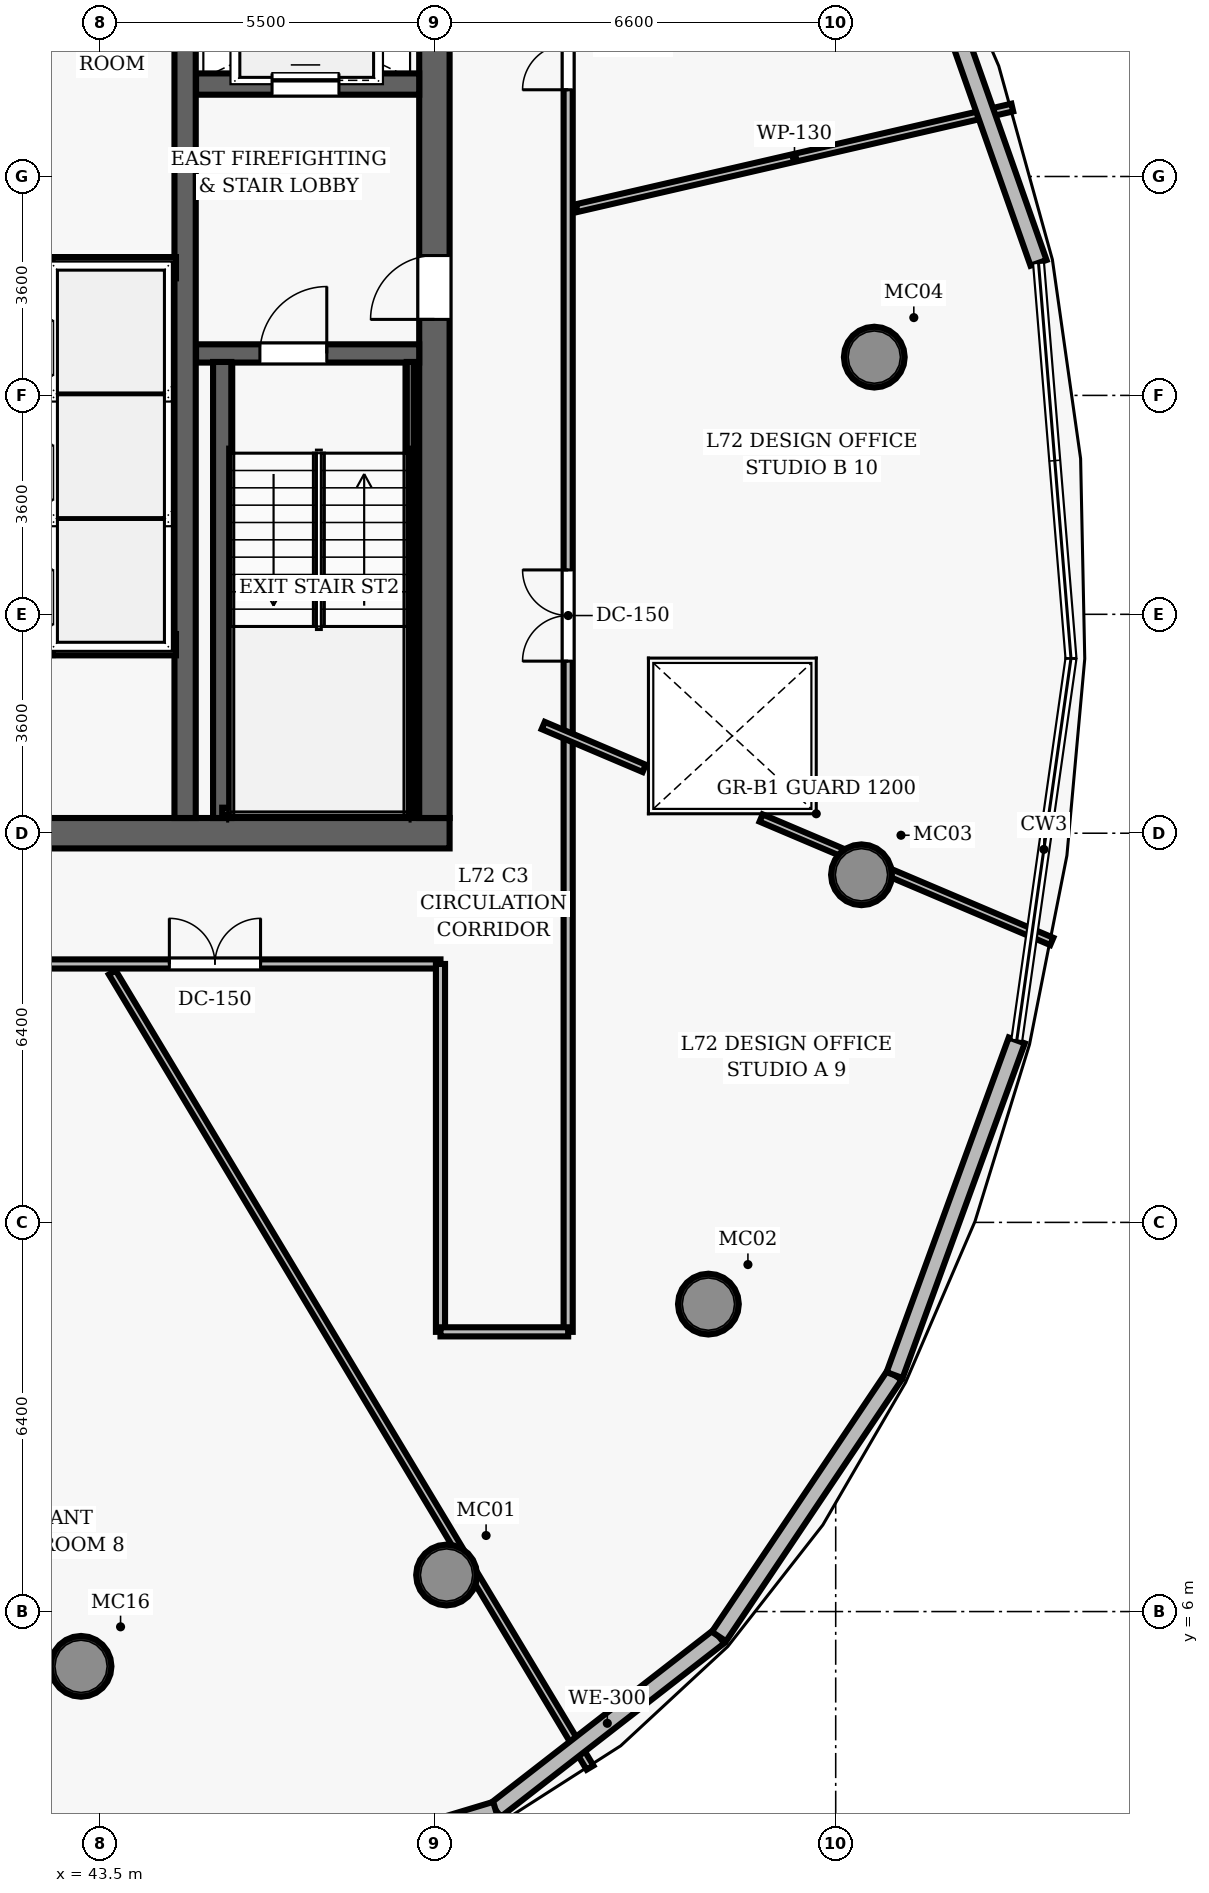
"""IFC4 building model, lengths in metres.
Left out: names, types, materials, properties, quantities, classifications, styles, units other than length and angle.
Written with IfcOpenShell. Run it as: python <this file> out.ifc"""

import sys

from ifc_helpers import new_model, si_unit, direction, frame, frame_2d, origin, origin_2d, place, context, subcontext, project, spatial, rectangle, hollow_circle, extrude, element, fill, save


model = new_model("IFC4")
c1 = context("Model", 3, precision=1e-05, world=origin(), true_north=direction((0.0, 1.0)))
c2 = subcontext(c1, "Body", "Model", "MODEL_VIEW")
j1 = project(units=[si_unit("LENGTHUNIT", "METRE"), si_unit("PLANEANGLEUNIT", "RADIAN")], contexts=[c1])
p1 = place(None, origin())
s1 = spatial("IfcSite", under=j1, at=p1, CompositionType="ELEMENT")
p2 = place(p1, origin())
s2 = spatial("IfcBuilding", under=s1, at=p2, CompositionType="ELEMENT")
p3 = place(p2, frame((0.0, 0.0, 284.4)))
s3 = spatial("IfcBuildingStorey", under=s2, at=p3, CompositionType="ELEMENT", Elevation=284.4)
p4 = place(p3, frame((26.75, 18.8, 0.0), z_axis=(0.0, 0.0, 1.0), x_axis=(1.0, 0.0, 0.0)))
e1 = element("IfcWall", 1, at=p4, inside=s3, PredefinedType="SHEAR", context=c2, shape_type="SweptSolid", body=[
    extrude(rectangle(XDim=22.5, YDim=0.5, at=frame_2d((11.25, 0.0))), origin(), (0.0, 0.0, 1.0), 3.85),
])
p5 = place(p4, frame((14.47, 0.0, 0.0)))
e2 = element("IfcOpeningElement", 2, at=p5, cuts=e1, PredefinedType="OPENING", context=c2, shape_type="SweptSolid", body=[
    extrude(rectangle(XDim=1.05, YDim=2.15, at=frame_2d((0.525, 1.075))), frame((0.0, 0.26, 0.0), z_axis=(0.0, -1.0, 0.0), x_axis=(1.0, 0.0, 0.0)), (0.0, 0.0, 1.0), 0.52),
])
p6 = place(p3, frame((49.0, 19.05, 0.0), z_axis=(0.0, 0.0, 1.0), x_axis=(0.0, 1.0, 0.0)))
e3 = element("IfcWall", 3, at=p6, inside=s3, PredefinedType="SHEAR", context=c2, shape_type="SweptSolid", body=[
    extrude(rectangle(XDim=13.9, YDim=0.5, at=frame_2d((6.95, 0.0))), origin(), (0.0, 0.0, 1.0), 3.85),
])
p7 = place(p6, frame((8.2, 0.0, 0.0)))
e4 = element("IfcOpeningElement", 4, at=p7, cuts=e3, PredefinedType="OPENING", context=c2, shape_type="SweptSolid", body=[
    extrude(rectangle(XDim=1.05, YDim=2.15, at=frame_2d((0.525, 1.075))), frame((0.0, 0.26, 0.0), z_axis=(0.0, -1.0, 0.0), x_axis=(1.0, 0.0, 0.0)), (0.0, 0.0, 1.0), 0.52),
])
p8 = place(p3, frame((44.9, 19.05, 0.0), z_axis=(0.0, 0.0, 1.0), x_axis=(0.0, 1.0, 0.0)))
e5 = element("IfcWall", 5, at=p8, inside=s3, PredefinedType="SHEAR", context=c2, shape_type="SweptSolid", body=[
    extrude(rectangle(XDim=13.9, YDim=0.35, at=frame_2d((6.95, 0.0))), origin(), (0.0, 0.0, 1.0), 3.85),
])
for number, where, z_axis, x_axis in (
    (6, (49.2, 6.601, 0.0), (0.0, 0.0, 1.0), (1.0, 0.0, 0.0)),
    (7, (53.506, 11.056, 0.0), (0.0, 0.0, 1.0), (1.0, 0.0, 0.0)),
    (8, (56.024, 18.116, 0.0), (0.0, 0.0, 1.0), (1.0, 0.0, 0.0)),
    (9, (56.235, 26.629, 0.0), (0.0, 0.0, 1.0), (1.0, 0.0, 0.0)),
    (10, (43.188, 5.099, 0.0), (0.0, 0.0, 1.0), (1.0, 0.0, 0.0)),
):
    element("IfcColumn", number, at=place(p3, frame(where, z_axis=z_axis, x_axis=x_axis)), inside=s3, PredefinedType="COLUMN", context=c2, shape_type="SweptSolid", body=[
        extrude(hollow_circle(Radius=0.5, WallThickness=0.045, at=origin_2d()), origin(), (0.0, 0.0, 1.0), 3.85),
    ])
p9 = place(p3, frame((45.08, 26.69, 0.0), z_axis=(0.0, 0.0, 1.0), x_axis=(1.0, 0.0, 0.0)))
e11 = element("IfcWall", 11, at=p9, inside=s3, PredefinedType="SHEAR", context=c2, shape_type="SweptSolid", body=[
    extrude(rectangle(XDim=3.67, YDim=0.3, at=frame_2d((1.835, 0.0))), origin(), (0.0, 0.0, 1.0), 3.85),
])
p10 = place(p9, frame((1.05, 0.0, 0.0)))
e12 = element("IfcOpeningElement", 12, at=p10, cuts=e11, PredefinedType="OPENING", context=c2, shape_type="SweptSolid", body=[
    extrude(rectangle(XDim=1.1, YDim=2.15, at=frame_2d((0.55, 1.075))), frame((0.0, 0.16, 0.0), z_axis=(0.0, -1.0, 0.0), x_axis=(1.0, 0.0, 0.0)), (0.0, 0.0, 1.0), 0.32),
])
p11 = place(p3, frame((45.51, 19.05, 0.0), z_axis=(0.0, 0.0, 1.0), x_axis=(0.0, 1.0, 0.0)))
e13 = element("IfcWall", 13, at=p11, inside=s3, PredefinedType="SHEAR", context=c2, shape_type="SweptSolid", body=[
    extrude(rectangle(XDim=7.5, YDim=0.3, at=frame_2d((3.75, 0.0))), origin(), (0.0, 0.0, 1.0), 3.85),
])
p12 = place(p3, frame((48.605, 19.1, 0.0), z_axis=(0.0, 0.0, 1.0), x_axis=(0.0, 1.0, 0.0)))
e14 = element("IfcWall", 14, at=p12, inside=s3, PredefinedType="SHEAR", context=c2, shape_type="SweptSolid", body=[
    extrude(rectangle(XDim=7.45, YDim=0.12, at=frame_2d((3.725, 0.0))), origin(), (0.0, 0.0, 1.0), 3.85),
])
p13 = place(p3, frame((45.51, 19.16, 0.0), z_axis=(0.0, 0.0, 1.0), x_axis=(1.0, 0.0, 0.0)))
e15 = element("IfcWall", 15, at=p13, inside=s3, PredefinedType="SHEAR", context=c2, shape_type="SweptSolid", body=[
    extrude(rectangle(XDim=3.095, YDim=0.12, at=frame_2d((1.547, 0.0))), origin(), (0.0, 0.0, 1.0), 3.85),
])
p14 = place(p3, frame((45.08, 31.12, 0.0), z_axis=(0.0, 0.0, 1.0), x_axis=(1.0, 0.0, 0.0)))
e16 = element("IfcWall", 16, at=p14, inside=s3, PredefinedType="SHEAR", context=c2, shape_type="SweptSolid", body=[
    extrude(rectangle(XDim=3.67, YDim=0.35, at=frame_2d((1.835, 0.0))), origin(), (0.0, 0.0, 1.0), 3.04),
])
p15 = place(p14, frame((1.25, 0.0, 0.0)))
e17 = element("IfcOpeningElement", 17, at=p15, cuts=e16, PredefinedType="OPENING", context=c2, shape_type="SweptSolid", body=[
    extrude(rectangle(XDim=1.1, YDim=2.15, at=frame_2d((0.55, 1.075))), frame((0.0, 0.185, 0.0), z_axis=(0.0, -1.0, 0.0), x_axis=(1.0, 0.0, 0.0)), (0.0, 0.0, 1.0), 0.37),
])
p16 = place(p3, frame((42.55, 21.73, 0.0), z_axis=(0.0, 0.0, 1.0), x_axis=(0.0, 1.0, 0.0)))
e18 = element("IfcWall", 18, at=p16, inside=s3, PredefinedType="SHEAR", context=c2, shape_type="SweptSolid", body=[
    extrude(rectangle(XDim=6.54, YDim=0.35, at=frame_2d((3.27, 0.0))), origin(), (0.0, 0.0, 1.0), 3.04),
])
p17 = place(p16, frame((0.5, 0.0, 0.0)))
e19 = element("IfcOpeningElement", 19, at=p17, cuts=e18, PredefinedType="OPENING", context=c2, shape_type="SweptSolid", body=[
    extrude(rectangle(XDim=0.9, YDim=2.15, at=frame_2d((0.45, 1.075))), frame((0.0, 0.185, 0.0), z_axis=(0.0, -1.0, 0.0), x_axis=(1.0, 0.0, 0.0)), (0.0, 0.0, 1.0), 0.37),
])
p18 = place(p16, frame((2.55, 0.0, 0.0)))
e20 = element("IfcOpeningElement", 20, at=p18, cuts=e18, PredefinedType="OPENING", context=c2, shape_type="SweptSolid", body=[
    extrude(rectangle(XDim=0.9, YDim=2.15, at=frame_2d((0.45, 1.075))), frame((0.0, 0.185, 0.0), z_axis=(0.0, -1.0, 0.0), x_axis=(1.0, 0.0, 0.0)), (0.0, 0.0, 1.0), 0.37),
])
p19 = place(p16, frame((4.6, 0.0, 0.0)))
e21 = element("IfcOpeningElement", 21, at=p19, cuts=e18, PredefinedType="OPENING", context=c2, shape_type="SweptSolid", body=[
    extrude(rectangle(XDim=0.9, YDim=2.15, at=frame_2d((0.45, 1.075))), frame((0.0, 0.185, 0.0), z_axis=(0.0, -1.0, 0.0), x_axis=(1.0, 0.0, 0.0)), (0.0, 0.0, 1.0), 0.37),
])
for number, where, z_axis, x_axis in (
    (22, (42.72, 21.9, 0.0), (0.0, 0.0, 1.0), (1.0, 0.0, 0.0)),
    (23, (42.72, 28.1, 0.0), (0.0, 0.0, 1.0), (1.0, 0.0, 0.0)),
):
    element("IfcWall", number, at=place(p3, frame(where, z_axis=z_axis, x_axis=x_axis)), inside=s3, PredefinedType="SHEAR", context=c2, shape_type="SweptSolid", body=[
        extrude(rectangle(XDim=2.03, YDim=0.35, at=frame_2d((1.015, 0.0))), origin(), (0.0, 0.0, 1.0), 3.04),
    ])
p20 = place(p3, frame((26.9, 16.65, 0.0), z_axis=(0.0, 0.0, 1.0), x_axis=(1.0, 0.0, 0.0)))
e24 = element("IfcWall", 24, at=p20, inside=s3, PredefinedType="PARTITIONING", context=c2, shape_type="SweptSolid", body=[
    extrude(rectangle(XDim=22.2, YDim=0.15, at=frame_2d((11.1, 0.0))), origin(), (0.0, 0.0, 1.0), 3.04),
])
p21 = place(p20, frame((7.813, 0.0, 0.0)))
e25 = element("IfcOpeningElement", 25, at=p21, cuts=e24, PredefinedType="OPENING", context=c2, shape_type="SweptSolid", body=[
    extrude(rectangle(XDim=1.5, YDim=2.2, at=frame_2d((0.75, 1.1))), frame((0.0, 0.085, 0.0), z_axis=(0.0, -1.0, 0.0), x_axis=(1.0, 0.0, 0.0)), (0.0, 0.0, 1.0), 0.17),
])
p22 = place(p20, frame((14.125, 0.0, 0.0)))
e26 = element("IfcOpeningElement", 26, at=p22, cuts=e24, PredefinedType="OPENING", context=c2, shape_type="SweptSolid", body=[
    extrude(rectangle(XDim=0.95, YDim=2.15, at=frame_2d((0.475, 1.075))), frame((0.0, 0.085, 0.0), z_axis=(0.0, -1.0, 0.0), x_axis=(1.0, 0.0, 0.0)), (0.0, 0.0, 1.0), 0.17),
])
p23 = place(p20, frame((17.741, 0.0, 0.0)))
e27 = element("IfcOpeningElement", 27, at=p23, cuts=e24, PredefinedType="OPENING", context=c2, shape_type="SweptSolid", body=[
    extrude(rectangle(XDim=1.5, YDim=2.2, at=frame_2d((0.75, 1.1))), frame((0.0, 0.085, 0.0), z_axis=(0.0, -1.0, 0.0), x_axis=(1.0, 0.0, 0.0)), (0.0, 0.0, 1.0), 0.17),
])
p24 = place(p3, frame((51.2, 10.6, 0.0), z_axis=(0.0, 0.0, 1.0), x_axis=(0.0, 1.0, 0.0)))
e28 = element("IfcWall", 28, at=p24, inside=s3, PredefinedType="PARTITIONING", context=c2, shape_type="SweptSolid", body=[
    extrude(rectangle(XDim=30.168, YDim=0.15, at=frame_2d((15.084, 0.0))), origin(), (0.0, 0.0, 1.0), 3.04),
])
p25 = place(p24, frame((20.426, 0.0, 0.0)))
e29 = element("IfcOpeningElement", 29, at=p25, cuts=e28, PredefinedType="OPENING", context=c2, shape_type="SweptSolid", body=[
    extrude(rectangle(XDim=1.5, YDim=2.2, at=frame_2d((0.75, 1.1))), frame((0.0, 0.085, 0.0), z_axis=(0.0, -1.0, 0.0), x_axis=(1.0, 0.0, 0.0)), (0.0, 0.0, 1.0), 0.17),
])
p26 = place(p24, frame((11.03, 0.0, 0.0)))
e30 = element("IfcOpeningElement", 30, at=p26, cuts=e28, PredefinedType="OPENING", context=c2, shape_type="SweptSolid", body=[
    extrude(rectangle(XDim=1.5, YDim=2.2, at=frame_2d((0.75, 1.1))), frame((0.0, 0.085, 0.0), z_axis=(0.0, -1.0, 0.0), x_axis=(1.0, 0.0, 0.0)), (0.0, 0.0, 1.0), 0.17),
])
p27 = place(p3, frame((49.1, 10.6, 0.0), z_axis=(0.0, 0.0, 1.0), x_axis=(0.0, 1.0, 0.0)))
e31 = element("IfcWall", 31, at=p27, inside=s3, PredefinedType="PARTITIONING", context=c2, shape_type="SweptSolid", body=[
    extrude(rectangle(XDim=6.05, YDim=0.15, at=frame_2d((3.025, 0.0))), origin(), (0.0, 0.0, 1.0), 3.04),
])
p28 = place(p3, frame((49.1, 10.6, 0.0), z_axis=(0.0, 0.0, 1.0), x_axis=(1.0, 0.0, 0.0)))
e32 = element("IfcWall", 32, at=p28, inside=s3, PredefinedType="PARTITIONING", context=c2, shape_type="SweptSolid", body=[
    extrude(rectangle(XDim=2.1, YDim=0.15, at=frame_2d((1.05, 0.0))), origin(), (0.0, 0.0, 1.0), 3.04),
])
p29 = place(p3, frame((51.34, 29.08, 0.0), z_axis=(0.0, 0.0, 1.0), x_axis=(0.974374403815, 0.224932259114, 0.0)))
e33 = element("IfcWall", 33, at=p29, inside=s3, PredefinedType="PARTITIONING", context=c2, shape_type="SweptSolid", body=[
    extrude(rectangle(XDim=7.353, YDim=0.13, at=frame_2d((3.676, 0.0))), origin(), (0.0, 0.0, 1.0), 3.04),
])
p30 = place(p3, frame((43.702, 16.51, 0.0), z_axis=(0.0, 0.0, 1.0), x_axis=(0.515029895514, -0.857172215326, 0.0)))
e34 = element("IfcWall", 34, at=p30, inside=s3, PredefinedType="PARTITIONING", context=c2, shape_type="SweptSolid", body=[
    extrude(rectangle(XDim=15.255, YDim=0.13, at=frame_2d((7.628, 0.0))), origin(), (0.0, 0.0, 1.0), 3.04),
])
p31 = place(p3, frame((50.79, 20.571, 0.0), z_axis=(0.0, 0.0, 1.0), x_axis=(0.920456362026, -0.390845347429, 0.0)))
e35 = element("IfcWall", 35, at=p31, inside=s3, PredefinedType="PARTITIONING", context=c2, shape_type="SweptSolid", body=[
    extrude(rectangle(XDim=1.803, YDim=0.13, at=frame_2d((0.902, 0.0))), origin(), (0.0, 0.0, 1.0), 3.04),
])
p32 = place(p3, frame((54.373, 19.05, 0.0), z_axis=(0.0, 0.0, 1.0), x_axis=(0.920491611713, -0.390762322603, 0.0)))
e36 = element("IfcWall", 36, at=p32, inside=s3, PredefinedType="PARTITIONING", context=c2, shape_type="SweptSolid", body=[
    extrude(rectangle(XDim=5.193, YDim=0.13, at=frame_2d((2.597, 0.0))), origin(), (0.0, 0.0, 1.0), 3.04),
])
p33 = place(p3, frame((53.68, 5.589, 0.0), z_axis=(0.0, 0.0, 1.0), x_axis=(-0.789685647457, -0.613511677314, 0.0)))
e37 = element("IfcWall", 37, at=p33, inside=s3, PredefinedType="SOLIDWALL", context=c2, shape_type="SweptSolid", body=[
    extrude(rectangle(XDim=4.651, YDim=0.28, at=frame_2d((2.325, 0.0))), origin(), (0.0, 0.0, 1.0), 3.625),
])
p34 = place(p3, frame((56.568, 9.888, 0.0), z_axis=(0.0, 0.0, 1.0), x_axis=(-0.557655573971, -0.830072443115, 0.0)))
e38 = element("IfcWall", 38, at=p34, inside=s3, PredefinedType="SOLIDWALL", context=c2, shape_type="SweptSolid", body=[
    extrude(rectangle(XDim=5.179, YDim=0.28, at=frame_2d((2.59, 0.0))), origin(), (0.0, 0.0, 1.0), 3.625),
])
p35 = place(p3, frame((58.578, 15.393, 0.0), z_axis=(0.0, 0.0, 1.0), x_axis=(-0.342960397208, -0.939349863441, 0.0)))
e39 = element("IfcWall", 39, at=p35, inside=s3, PredefinedType="SOLIDWALL", context=c2, shape_type="SweptSolid", body=[
    extrude(rectangle(XDim=5.86, YDim=0.28, at=frame_2d((2.93, 0.0))), origin(), (0.0, 0.0, 1.0), 3.625),
])
p36 = place(p3, frame((56.766, 34.335, 0.0), z_axis=(0.0, 0.0, 1.0), x_axis=(0.332463989461, -0.943115950301, 0.0)))
e40 = element("IfcWall", 40, at=p36, inside=s3, PredefinedType="SOLIDWALL", context=c2, shape_type="SweptSolid", body=[
    extrude(rectangle(XDim=6.527, YDim=0.28, at=frame_2d((3.263, 0.0))), origin(), (0.0, 0.0, 1.0), 3.625),
])
p37 = place(p3, frame((50.007, 2.736, 0.0), z_axis=(0.0, 0.0, 1.0), x_axis=(-0.957551320762, -0.288262845521, 0.0)))
e41 = element("IfcWall", 41, at=p37, inside=s3, PredefinedType="SOLIDWALL", context=c2, shape_type="SweptSolid", body=[
    extrude(rectangle(XDim=4.651, YDim=0.28, at=frame_2d((2.325, 0.0))), origin(), (0.0, 0.0, 1.0), 3.625),
])
p38 = place(p10, origin())
e42 = element("IfcDoor", 42, at=p38, inside=s3, OperationType="SINGLE_SWING_RIGHT", PredefinedType="DOOR", context=c2, shape_type="SweptSolid", body=[
    extrude(rectangle(XDim=1.1, YDim=2.15, at=frame_2d((0.55, 1.075))), frame((0.0, 0.025, 0.0), z_axis=(0.0, -1.0, 0.0), x_axis=(1.0, 0.0, 0.0)), (0.0, 0.0, 1.0), 0.05),
])
fill(e12, e42)
p39 = place(p7, origin())
e43 = element("IfcDoor", 43, at=p39, inside=s3, OperationType="SINGLE_SWING_LEFT", PredefinedType="DOOR", context=c2, shape_type="SweptSolid", body=[
    extrude(rectangle(XDim=1.05, YDim=2.15, at=frame_2d((0.525, 1.075))), frame((0.0, 0.025, 0.0), z_axis=(0.0, -1.0, 0.0), x_axis=(1.0, 0.0, 0.0)), (0.0, 0.0, 1.0), 0.05),
])
fill(e4, e43)
p40 = place(p25, origin())
e44 = element("IfcDoor", 44, at=p40, inside=s3, OperationType="DOUBLE_DOOR_SINGLE_SWING", PredefinedType="DOOR", context=c2, shape_type="SweptSolid", body=[
    extrude(rectangle(XDim=1.5, YDim=2.2, at=frame_2d((0.75, 1.1))), frame((0.0, 0.025, 0.0), z_axis=(0.0, -1.0, 0.0), x_axis=(1.0, 0.0, 0.0)), (0.0, 0.0, 1.0), 0.05),
])
fill(e29, e44)
p41 = place(p23, origin())
e45 = element("IfcDoor", 45, at=p41, inside=s3, OperationType="DOUBLE_DOOR_SINGLE_SWING", PredefinedType="DOOR", context=c2, shape_type="SweptSolid", body=[
    extrude(rectangle(XDim=1.5, YDim=2.2, at=frame_2d((0.75, 1.1))), frame((0.0, 0.025, 0.0), z_axis=(0.0, -1.0, 0.0), x_axis=(1.0, 0.0, 0.0)), (0.0, 0.0, 1.0), 0.05),
])
fill(e27, e45)
p42 = place(p26, origin())
e46 = element("IfcDoor", 46, at=p42, inside=s3, OperationType="DOUBLE_DOOR_SINGLE_SWING", PredefinedType="DOOR", context=c2, shape_type="SweptSolid", body=[
    extrude(rectangle(XDim=1.5, YDim=2.2, at=frame_2d((0.75, 1.1))), frame((0.0, 0.025, 0.0), z_axis=(0.0, -1.0, 0.0), x_axis=(1.0, 0.0, 0.0)), (0.0, 0.0, 1.0), 0.05),
])
fill(e30, e46)
p43 = place(p15, origin())
e47 = element("IfcDoor", 47, at=p43, inside=s3, OperationType="SLIDING_TO_LEFT", PredefinedType="DOOR", context=c2, shape_type="SweptSolid", body=[
    extrude(rectangle(XDim=1.1, YDim=2.15, at=frame_2d((0.55, 1.075))), frame((0.0, 0.025, 0.0), z_axis=(0.0, -1.0, 0.0), x_axis=(1.0, 0.0, 0.0)), (0.0, 0.0, 1.0), 0.05),
])
fill(e17, e47)
save(model, sys.argv[1])
